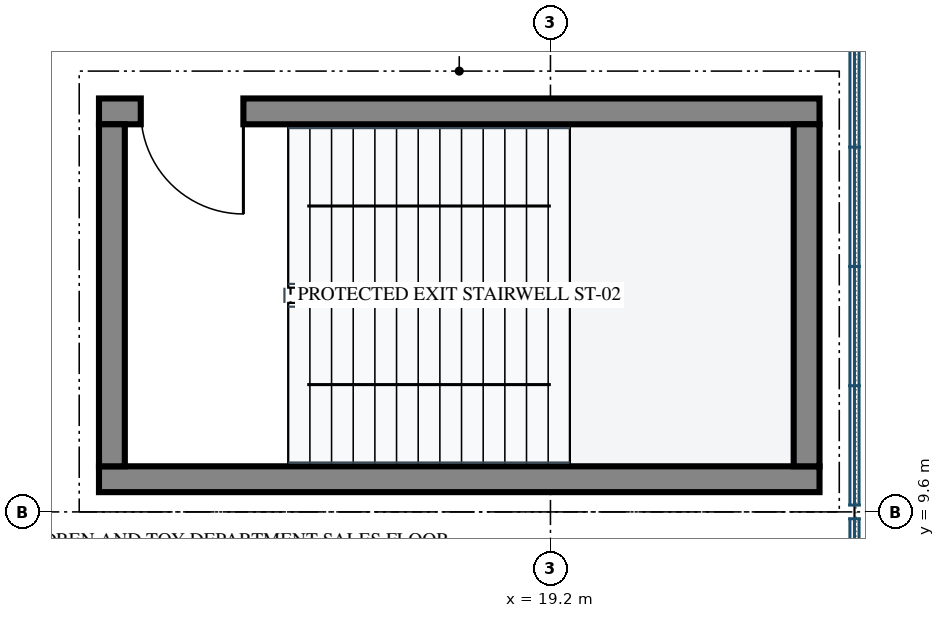
"""IFC4 building model, lengths in metres.
Left out: names, types, materials, properties, quantities, classifications, styles, units other than length and angle.
Written with IfcOpenShell. Run it as: python <this file> out.ifc"""

import sys

from ifc_helpers import new_model, si_unit, direction, frame, frame_2d, origin, place, context, subcontext, project, spatial, rectangle, extrude, element, fill, save


model = new_model("IFC4")
c1 = context("Model", 3, precision=1e-05, world=origin(), true_north=direction((0.0, 1.0)))
c2 = subcontext(c1, "Body", "Model", "MODEL_VIEW")
j1 = project(units=[si_unit("LENGTHUNIT", "METRE"), si_unit("PLANEANGLEUNIT", "RADIAN")], contexts=[c1])
p1 = place(None, origin())
s1 = spatial("IfcSite", under=j1, at=p1, CompositionType="ELEMENT")
p2 = place(p1, origin())
s2 = spatial("IfcBuilding", under=s1, at=p2, CompositionType="ELEMENT")
p3 = place(p2, frame((0.0, 0.0, 19.8)))
s3 = spatial("IfcBuildingStorey", under=s2, at=p3, CompositionType="ELEMENT", Elevation=19.8)
p4 = place(p3, frame((13.26, 10.03, 0.0), z_axis=(0.0, 0.0, 1.0), x_axis=(1.0, 0.0, 0.0)))
e1 = element("IfcWall", 1, at=p4, inside=s3, PredefinedType="SHEAR", context=c2, shape_type="SweptSolid", body=[
    extrude(rectangle(XDim=9.48, YDim=0.34, at=frame_2d((4.74, 0.0))), origin(), (0.0, 0.0, 1.0), 4.48),
])
p5 = place(p3, frame((13.26, 14.87, 0.0), z_axis=(0.0, 0.0, 1.0), x_axis=(1.0, 0.0, 0.0)))
e2 = element("IfcWall", 2, at=p5, inside=s3, PredefinedType="SHEAR", context=c2, shape_type="SweptSolid", body=[
    extrude(rectangle(XDim=9.48, YDim=0.34, at=frame_2d((4.74, 0.0))), origin(), (0.0, 0.0, 1.0), 4.48),
])
p6 = place(p5, frame((0.55, 0.0, 0.0)))
e3 = element("IfcOpeningElement", 3, at=p6, cuts=e2, PredefinedType="OPENING", context=c2, shape_type="SweptSolid", body=[
    extrude(rectangle(XDim=1.35, YDim=2.2, at=frame_2d((0.675, 1.1))), frame((0.0, 0.182, 0.0), z_axis=(0.0, -1.0, 0.0), x_axis=(1.0, 0.0, 0.0)), (0.0, 0.0, 1.0), 0.364),
])
for number, where, z_axis, x_axis in (
    (4, (22.57, 10.2, 0.0), (0.0, 0.0, 1.0), (0.0, 1.0, 0.0)),
    (5, (13.43, 10.2, 0.0), (0.0, 0.0, 1.0), (0.0, 1.0, 0.0)),
):
    element("IfcWall", number, at=place(p3, frame(where, z_axis=z_axis, x_axis=x_axis)), inside=s3, PredefinedType="SHEAR", context=c2, shape_type="SweptSolid", body=[
        extrude(rectangle(XDim=4.5, YDim=0.34, at=frame_2d((2.25, 0.0))), origin(), (0.0, 0.0, 1.0), 4.48),
    ])
p7 = place(p6, frame((1.35, 0.0, 0.0), z_axis=(0.0, 0.0, 1.0), x_axis=(-1.0, 0.0, 0.0)))
e6 = element("IfcDoor", 6, at=p7, inside=s3, OperationType="SINGLE_SWING_LEFT", PredefinedType="DOOR", context=c2, shape_type="SweptSolid", body=[
    extrude(rectangle(XDim=1.35, YDim=2.2, at=frame_2d((0.675, 1.1))), frame((0.0, 0.025, 0.0), z_axis=(0.0, -1.0, 0.0), x_axis=(1.0, 0.0, 0.0)), (0.0, 0.0, 1.0), 0.05),
])
fill(e3, e6)
save(model, sys.argv[1])
